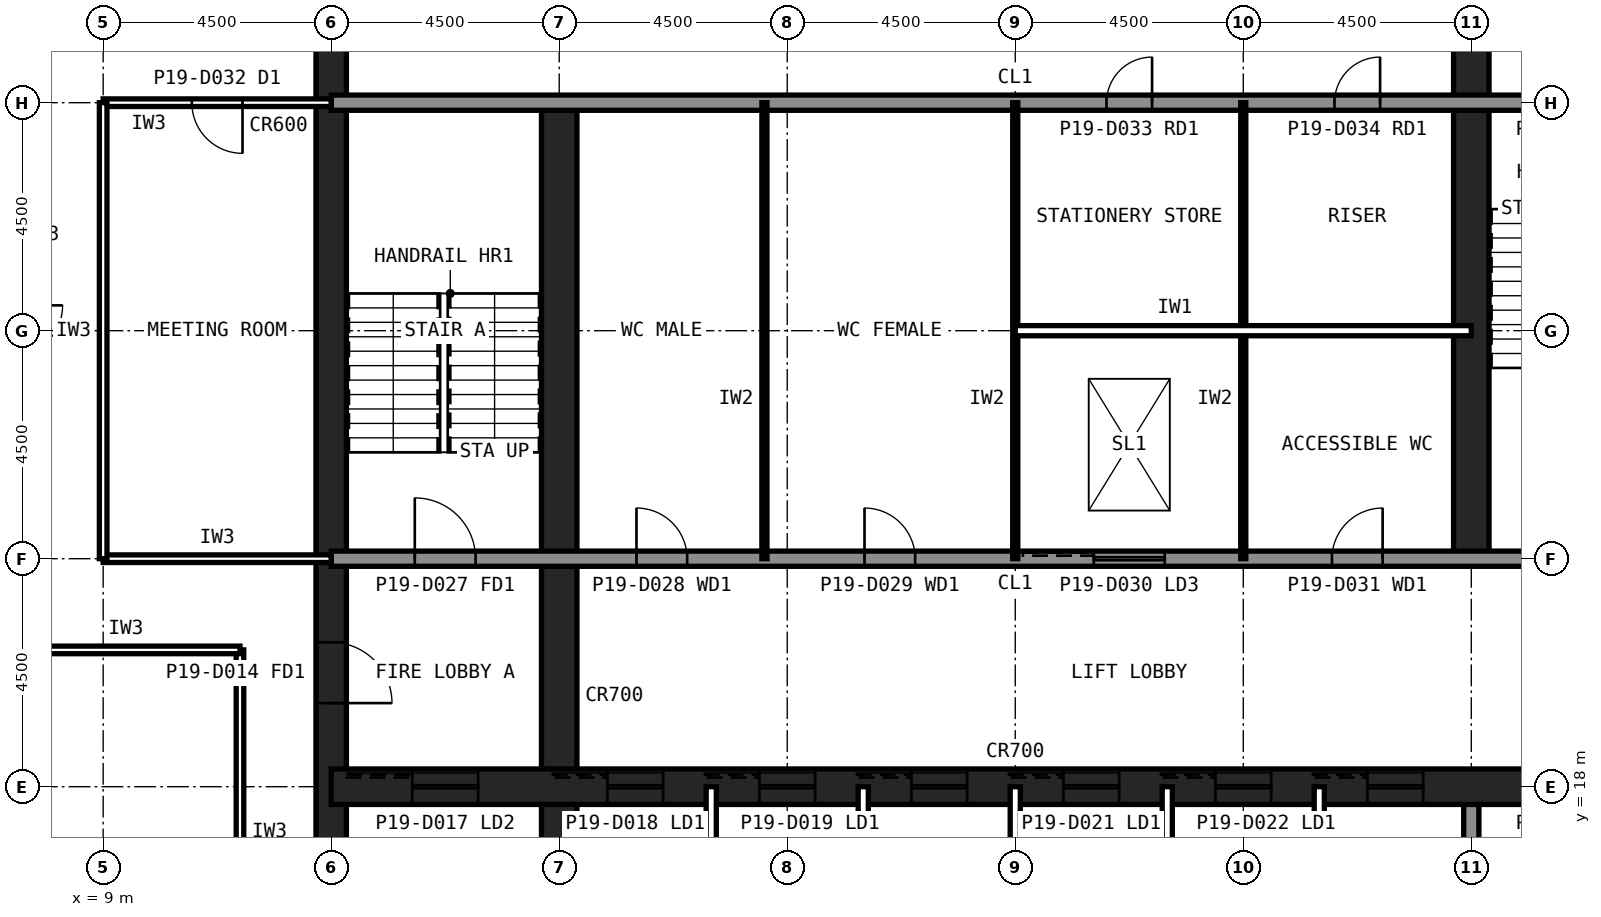
"""IFC4 building model, lengths in metres.
Left out: names, types, materials, properties, quantities, classifications, styles, units other than length and angle.
Written with IfcOpenShell. Run it as: python <this file> out.ifc"""

import sys

from ifc_helpers import new_model, si_unit, direction, frame, frame_2d, origin, place, context, subcontext, project, spatial, rectangle, extrude, element, fill, save


model = new_model("IFC4")
c1 = context("Model", 3, precision=1e-05, world=origin(), true_north=direction((0.0, 1.0)))
c2 = subcontext(c1, "Body", "Model", "MODEL_VIEW")
j1 = project(units=[si_unit("LENGTHUNIT", "METRE"), si_unit("PLANEANGLEUNIT", "RADIAN")], contexts=[c1])
p1 = place(None, origin())
s1 = spatial("IfcSite", under=j1, at=p1, CompositionType="ELEMENT")
p2 = place(p1, origin())
s2 = spatial("IfcBuilding", under=s1, at=p2, CompositionType="ELEMENT")
p3 = place(p2, frame((0.0, 0.0, 79.4)))
s3 = spatial("IfcBuildingStorey", under=s2, at=p3, CompositionType="ELEMENT", Elevation=79.4)
p4 = place(p3, frame((13.5, 40.5, 0.0), z_axis=(0.0, 0.0, 1.0), x_axis=(0.0, -1.0, 0.0)))
e1 = element("IfcWall", 1, at=p4, inside=s3, PredefinedType="SHEAR", context=c2, shape_type="SweptSolid", body=[
    extrude(rectangle(XDim=27.0, YDim=0.6, at=frame_2d((13.5, 0.0))), origin(), (0.0, 0.0, 1.0), 4.2),
])
p5 = place(p4, frame((19.65, 0.0, 0.0)))
e2 = element("IfcOpeningElement", 2, at=p5, cuts=e1, PredefinedType="OPENING", context=c2, shape_type="SweptSolid", body=[
    extrude(rectangle(XDim=1.2, YDim=2.1, at=frame_2d((0.6, 1.05))), frame((0.0, 0.31, 0.0), z_axis=(0.0, -1.0, 0.0), x_axis=(1.0, 0.0, 0.0)), (0.0, 0.0, 1.0), 0.62),
])
p6 = place(p4, frame((5.85, 0.0, 0.0)))
e3 = element("IfcOpeningElement", 3, at=p6, cuts=e1, PredefinedType="OPENING", context=c2, shape_type="SweptSolid", body=[
    extrude(rectangle(XDim=1.8, YDim=2.1, at=frame_2d((0.9, 1.05))), frame((0.0, 0.31, 0.0), z_axis=(0.0, -1.0, 0.0), x_axis=(1.0, 0.0, 0.0)), (0.0, 0.0, 1.0), 0.62),
])
p7 = place(p3, frame((18.0, 13.5, 0.0), z_axis=(0.0, 0.0, 1.0), x_axis=(0.0, 1.0, 0.0)))
e4 = element("IfcWall", 4, at=p7, inside=s3, PredefinedType="SHEAR", context=c2, shape_type="SweptSolid", body=[
    extrude(rectangle(XDim=18.0, YDim=0.7, at=frame_2d((9.0, 0.0))), origin(), (0.0, 0.0, 1.0), 4.2),
])
p8 = place(p3, frame((36.0, 13.5, 0.0), z_axis=(0.0, 0.0, 1.0), x_axis=(0.0, 1.0, 0.0)))
e5 = element("IfcWall", 5, at=p8, inside=s3, PredefinedType="SOLIDWALL", context=c2, shape_type="SweptSolid", body=[
    extrude(rectangle(XDim=4.5, YDim=0.3, at=frame_2d((2.25, 0.0))), origin(), (0.0, 0.0, 1.0), 4.04),
])
p9 = place(p3, frame((36.0, 22.5, 0.0), z_axis=(0.0, 0.0, 1.0), x_axis=(0.0, 1.0, 0.0)))
e6 = element("IfcWall", 6, at=p9, inside=s3, PredefinedType="SHEAR", context=c2, shape_type="SweptSolid", body=[
    extrude(rectangle(XDim=18.0, YDim=0.7, at=frame_2d((9.0, 0.0))), origin(), (0.0, 0.0, 1.0), 4.2),
])
p10 = place(p3, frame((13.5, 18.0, 0.0), z_axis=(0.0, 0.0, 1.0), x_axis=(1.0, 0.0, 0.0)))
e7 = element("IfcWall", 7, at=p10, inside=s3, PredefinedType="SHEAR", context=c2, shape_type="SweptSolid", body=[
    extrude(rectangle(XDim=27.0, YDim=0.7, at=frame_2d((13.5, 0.0))), origin(), (0.0, 0.0, 1.0), 4.2),
])
p11 = place(p10, frame((24.3, 0.0, 0.0)))
e8 = element("IfcOpeningElement", 8, at=p11, cuts=e7, PredefinedType="OPENING", context=c2, shape_type="SweptSolid", body=[
    extrude(rectangle(XDim=0.9, YDim=2.1, at=frame_2d((0.45, 1.05))), frame((0.0, 0.36, 0.0), z_axis=(0.0, -1.0, 0.0), x_axis=(1.0, 0.0, 0.0)), (0.0, 0.0, 1.0), 0.72),
])
p12 = place(p10, frame((5.45, 0.0, 0.0)))
e9 = element("IfcOpeningElement", 9, at=p12, cuts=e7, PredefinedType="OPENING", context=c2, shape_type="SweptSolid", body=[
    extrude(rectangle(XDim=1.1, YDim=2.1, at=frame_2d((0.55, 1.05))), frame((0.0, 0.36, 0.0), z_axis=(0.0, -1.0, 0.0), x_axis=(1.0, 0.0, 0.0)), (0.0, 0.0, 1.0), 0.72),
])
p13 = place(p10, frame((8.45, 0.0, 0.0)))
e10 = element("IfcOpeningElement", 10, at=p13, cuts=e7, PredefinedType="OPENING", context=c2, shape_type="SweptSolid", body=[
    extrude(rectangle(XDim=1.1, YDim=2.1, at=frame_2d((0.55, 1.05))), frame((0.0, 0.36, 0.0), z_axis=(0.0, -1.0, 0.0), x_axis=(1.0, 0.0, 0.0)), (0.0, 0.0, 1.0), 0.72),
])
p14 = place(p10, frame((11.45, 0.0, 0.0)))
e11 = element("IfcOpeningElement", 11, at=p14, cuts=e7, PredefinedType="OPENING", context=c2, shape_type="SweptSolid", body=[
    extrude(rectangle(XDim=1.1, YDim=2.1, at=frame_2d((0.55, 1.05))), frame((0.0, 0.36, 0.0), z_axis=(0.0, -1.0, 0.0), x_axis=(1.0, 0.0, 0.0)), (0.0, 0.0, 1.0), 0.72),
])
p15 = place(p10, frame((14.45, 0.0, 0.0)))
e12 = element("IfcOpeningElement", 12, at=p15, cuts=e7, PredefinedType="OPENING", context=c2, shape_type="SweptSolid", body=[
    extrude(rectangle(XDim=1.1, YDim=2.1, at=frame_2d((0.55, 1.05))), frame((0.0, 0.36, 0.0), z_axis=(0.0, -1.0, 0.0), x_axis=(1.0, 0.0, 0.0)), (0.0, 0.0, 1.0), 0.72),
])
p16 = place(p10, frame((17.45, 0.0, 0.0)))
e13 = element("IfcOpeningElement", 13, at=p16, cuts=e7, PredefinedType="OPENING", context=c2, shape_type="SweptSolid", body=[
    extrude(rectangle(XDim=1.1, YDim=2.1, at=frame_2d((0.55, 1.05))), frame((0.0, 0.36, 0.0), z_axis=(0.0, -1.0, 0.0), x_axis=(1.0, 0.0, 0.0)), (0.0, 0.0, 1.0), 0.72),
])
p17 = place(p10, frame((20.45, 0.0, 0.0)))
e14 = element("IfcOpeningElement", 14, at=p17, cuts=e7, PredefinedType="OPENING", context=c2, shape_type="SweptSolid", body=[
    extrude(rectangle(XDim=1.1, YDim=2.1, at=frame_2d((0.55, 1.05))), frame((0.0, 0.36, 0.0), z_axis=(0.0, -1.0, 0.0), x_axis=(1.0, 0.0, 0.0)), (0.0, 0.0, 1.0), 0.72),
])
p18 = place(p10, frame((1.6, 0.0, 0.0)))
e15 = element("IfcOpeningElement", 15, at=p18, cuts=e7, PredefinedType="OPENING", context=c2, shape_type="SweptSolid", body=[
    extrude(rectangle(XDim=1.3, YDim=2.2, at=frame_2d((0.65, 1.1))), frame((0.0, 0.36, 0.0), z_axis=(0.0, -1.0, 0.0), x_axis=(1.0, 0.0, 0.0)), (0.0, 0.0, 1.0), 0.72),
])
p19 = place(p3, frame((13.5, 22.5, 0.0), z_axis=(0.0, 0.0, 1.0), x_axis=(1.0, 0.0, 0.0)))
e16 = element("IfcWall", 16, at=p19, inside=s3, PredefinedType="SOLIDWALL", context=c2, shape_type="SweptSolid", body=[
    extrude(rectangle(XDim=27.0, YDim=0.3, at=frame_2d((13.5, 0.0))), origin(), (0.0, 0.0, 1.0), 4.04),
])
p20 = place(p19, frame((1.65, 0.0, 0.0)))
e17 = element("IfcOpeningElement", 17, at=p20, cuts=e16, PredefinedType="OPENING", context=c2, shape_type="SweptSolid", body=[
    extrude(rectangle(XDim=1.2, YDim=2.1, at=frame_2d((0.6, 1.05))), frame((0.0, 0.16, 0.0), z_axis=(0.0, -1.0, 0.0), x_axis=(1.0, 0.0, 0.0)), (0.0, 0.0, 1.0), 0.32),
])
p21 = place(p19, frame((6.025, 0.0, 0.0)))
e18 = element("IfcOpeningElement", 18, at=p21, cuts=e16, PredefinedType="OPENING", context=c2, shape_type="SweptSolid", body=[
    extrude(rectangle(XDim=1.0, YDim=2.1, at=frame_2d((0.5, 1.05))), frame((0.0, 0.16, 0.0), z_axis=(0.0, -1.0, 0.0), x_axis=(1.0, 0.0, 0.0)), (0.0, 0.0, 1.0), 0.32),
])
p22 = place(p19, frame((10.525, 0.0, 0.0)))
e19 = element("IfcOpeningElement", 19, at=p22, cuts=e16, PredefinedType="OPENING", context=c2, shape_type="SweptSolid", body=[
    extrude(rectangle(XDim=1.0, YDim=2.1, at=frame_2d((0.5, 1.05))), frame((0.0, 0.16, 0.0), z_axis=(0.0, -1.0, 0.0), x_axis=(1.0, 0.0, 0.0)), (0.0, 0.0, 1.0), 0.32),
])
p23 = place(p19, frame((19.75, 0.0, 0.0)))
e20 = element("IfcOpeningElement", 20, at=p23, cuts=e16, PredefinedType="OPENING", context=c2, shape_type="SweptSolid", body=[
    extrude(rectangle(XDim=1.0, YDim=2.1, at=frame_2d((0.5, 1.05))), frame((0.0, 0.16, 0.0), z_axis=(0.0, -1.0, 0.0), x_axis=(1.0, 0.0, 0.0)), (0.0, 0.0, 1.0), 0.32),
])
p24 = place(p19, frame((15.05, 0.0, 0.0)))
e21 = element("IfcOpeningElement", 21, at=p24, cuts=e16, PredefinedType="OPENING", context=c2, shape_type="SweptSolid", body=[
    extrude(rectangle(XDim=1.4, YDim=2.4, at=frame_2d((0.7, 1.2))), frame((0.0, 0.16, 0.0), z_axis=(0.0, -1.0, 0.0), x_axis=(1.0, 0.0, 0.0)), (0.0, 0.0, 1.0), 0.32),
])
p25 = place(p3, frame((13.5, 31.5, 0.0), z_axis=(0.0, 0.0, 1.0), x_axis=(1.0, 0.0, 0.0)))
e22 = element("IfcWall", 22, at=p25, inside=s3, PredefinedType="SOLIDWALL", context=c2, shape_type="SweptSolid", body=[
    extrude(rectangle(XDim=27.0, YDim=0.3, at=frame_2d((13.5, 0.0))), origin(), (0.0, 0.0, 1.0), 4.04),
])
p26 = place(p25, frame((24.15, 0.0, 0.0)))
e23 = element("IfcOpeningElement", 23, at=p26, cuts=e22, PredefinedType="OPENING", context=c2, shape_type="SweptSolid", body=[
    extrude(rectangle(XDim=1.2, YDim=2.1, at=frame_2d((0.6, 1.05))), frame((0.0, 0.16, 0.0), z_axis=(0.0, -1.0, 0.0), x_axis=(1.0, 0.0, 0.0)), (0.0, 0.0, 1.0), 0.32),
])
p27 = place(p25, frame((15.3, 0.0, 0.0)))
e24 = element("IfcOpeningElement", 24, at=p27, cuts=e22, PredefinedType="OPENING", context=c2, shape_type="SweptSolid", body=[
    extrude(rectangle(XDim=0.9, YDim=2.1, at=frame_2d((0.45, 1.05))), frame((0.0, 0.16, 0.0), z_axis=(0.0, -1.0, 0.0), x_axis=(1.0, 0.0, 0.0)), (0.0, 0.0, 1.0), 0.32),
])
p28 = place(p25, frame((19.8, 0.0, 0.0)))
e25 = element("IfcOpeningElement", 25, at=p28, cuts=e22, PredefinedType="OPENING", context=c2, shape_type="SweptSolid", body=[
    extrude(rectangle(XDim=0.9, YDim=2.1, at=frame_2d((0.45, 1.05))), frame((0.0, 0.16, 0.0), z_axis=(0.0, -1.0, 0.0), x_axis=(1.0, 0.0, 0.0)), (0.0, 0.0, 1.0), 0.32),
])
for number, where, z_axis, x_axis in (
    (26, (21.0, 13.5, 0.0), (0.0, 0.0, 1.0), (0.0, 1.0, 0.0)),
    (27, (24.0, 13.5, 0.0), (0.0, 0.0, 1.0), (0.0, 1.0, 0.0)),
    (28, (27.0, 13.5, 0.0), (0.0, 0.0, 1.0), (0.0, 1.0, 0.0)),
    (29, (30.0, 13.5, 0.0), (0.0, 0.0, 1.0), (0.0, 1.0, 0.0)),
    (30, (33.0, 13.5, 0.0), (0.0, 0.0, 1.0), (0.0, 1.0, 0.0)),
):
    element("IfcWall", number, at=place(p3, frame(where, z_axis=z_axis, x_axis=x_axis)), inside=s3, PredefinedType="PARTITIONING", context=c2, shape_type="SweptSolid", body=[
        extrude(rectangle(XDim=4.5, YDim=0.2, at=frame_2d((2.25, 0.0))), origin(), (0.0, 0.0, 1.0), 4.04),
    ])
for number, where, z_axis, x_axis in (
    (31, (22.05, 22.5, 0.0), (0.0, 0.0, 1.0), (0.0, 1.0, 0.0)),
    (32, (27.0, 22.5, 0.0), (0.0, 0.0, 1.0), (0.0, 1.0, 0.0)),
    (33, (31.5, 22.5, 0.0), (0.0, 0.0, 1.0), (0.0, 1.0, 0.0)),
):
    element("IfcWall", number, at=place(p3, frame(where, z_axis=z_axis, x_axis=x_axis)), inside=s3, PredefinedType="PLUMBINGWALL", context=c2, shape_type="SweptSolid", body=[
        extrude(rectangle(XDim=9.0, YDim=0.1, at=frame_2d((4.5, 0.0))), origin(), (0.0, 0.0, 1.0), 4.04),
    ])
p29 = place(p3, frame((27.0, 27.0, 0.0), z_axis=(0.0, 0.0, 1.0), x_axis=(1.0, 0.0, 0.0)))
e34 = element("IfcWall", 34, at=p29, inside=s3, PredefinedType="PARTITIONING", context=c2, shape_type="SweptSolid", body=[
    extrude(rectangle(XDim=9.0, YDim=0.2, at=frame_2d((4.5, 0.0))), origin(), (0.0, 0.0, 1.0), 4.04),
])
p30 = place(p3, frame((11.7, 20.7, 0.0), z_axis=(0.0, 0.0, 1.0), x_axis=(0.0, -1.0, 0.0)))
e35 = element("IfcWall", 35, at=p30, inside=s3, PredefinedType="PARTITIONING", context=c2, shape_type="SweptSolid", body=[
    extrude(rectangle(XDim=7.2, YDim=0.15, at=frame_2d((3.6, 0.0))), origin(), (0.0, 0.0, 1.0), 4.04),
])
p31 = place(p3, frame((7.2, 20.7, 0.0), z_axis=(0.0, 0.0, 1.0), x_axis=(1.0, 0.0, 0.0)))
e36 = element("IfcWall", 36, at=p31, inside=s3, PredefinedType="PARTITIONING", context=c2, shape_type="SweptSolid", body=[
    extrude(rectangle(XDim=4.5, YDim=0.15, at=frame_2d((2.25, 0.0))), origin(), (0.0, 0.0, 1.0), 4.04),
])
p32 = place(p3, frame((9.0, 22.5, 0.0), z_axis=(0.0, 0.0, 1.0), x_axis=(1.0, 0.0, 0.0)))
e37 = element("IfcWall", 37, at=p32, inside=s3, PredefinedType="PARTITIONING", context=c2, shape_type="SweptSolid", body=[
    extrude(rectangle(XDim=4.5, YDim=0.15, at=frame_2d((2.25, 0.0))), origin(), (0.0, 0.0, 1.0), 3.189),
])
p33 = place(p3, frame((13.5, 31.5, 0.0), z_axis=(0.0, 0.0, 1.0), x_axis=(-1.0, 0.0, 0.0)))
e38 = element("IfcWall", 38, at=p33, inside=s3, PredefinedType="PARTITIONING", context=c2, shape_type="SweptSolid", body=[
    extrude(rectangle(XDim=4.5, YDim=0.15, at=frame_2d((2.25, 0.0))), origin(), (0.0, 0.0, 1.0), 3.189),
])
p34 = place(p33, frame((1.75, 0.0, 0.0)))
e39 = element("IfcOpeningElement", 39, at=p34, cuts=e38, PredefinedType="OPENING", context=c2, shape_type="SweptSolid", body=[
    extrude(rectangle(XDim=1.0, YDim=2.1, at=frame_2d((0.5, 1.05))), frame((0.0, 0.085, 0.0), z_axis=(0.0, -1.0, 0.0), x_axis=(1.0, 0.0, 0.0)), (0.0, 0.0, 1.0), 0.17),
])
p35 = place(p3, frame((9.0, 31.5, 0.0), z_axis=(0.0, 0.0, 1.0), x_axis=(0.0, -1.0, 0.0)))
e40 = element("IfcWall", 40, at=p35, inside=s3, PredefinedType="PARTITIONING", context=c2, shape_type="SweptSolid", body=[
    extrude(rectangle(XDim=9.0, YDim=0.15, at=frame_2d((4.5, 0.0))), origin(), (0.0, 0.0, 1.0), 4.04),
])
p36 = place(p5, origin())
e41 = element("IfcDoor", 41, at=p36, inside=s3, OperationType="SINGLE_SWING_RIGHT", PredefinedType="DOOR", context=c2, shape_type="SweptSolid", body=[
    extrude(rectangle(XDim=1.2, YDim=2.1, at=frame_2d((0.6, 1.05))), frame((0.0, 0.025, 0.0), z_axis=(0.0, -1.0, 0.0), x_axis=(1.0, 0.0, 0.0)), (0.0, 0.0, 1.0), 0.05),
])
fill(e2, e41)
p37 = place(p20, origin())
e42 = element("IfcDoor", 42, at=p37, inside=s3, OperationType="SINGLE_SWING_LEFT", PredefinedType="DOOR", context=c2, shape_type="SweptSolid", body=[
    extrude(rectangle(XDim=1.2, YDim=2.1, at=frame_2d((0.6, 1.05))), frame((0.0, 0.025, 0.0), z_axis=(0.0, -1.0, 0.0), x_axis=(1.0, 0.0, 0.0)), (0.0, 0.0, 1.0), 0.05),
])
fill(e17, e42)
p38 = place(p21, origin())
e43 = element("IfcDoor", 43, at=p38, inside=s3, OperationType="SINGLE_SWING_LEFT", PredefinedType="DOOR", context=c2, shape_type="SweptSolid", body=[
    extrude(rectangle(XDim=1.0, YDim=2.1, at=frame_2d((0.5, 1.05))), frame((0.0, 0.025, 0.0), z_axis=(0.0, -1.0, 0.0), x_axis=(1.0, 0.0, 0.0)), (0.0, 0.0, 1.0), 0.05),
])
fill(e18, e43)
p39 = place(p22, origin())
e44 = element("IfcDoor", 44, at=p39, inside=s3, OperationType="SINGLE_SWING_LEFT", PredefinedType="DOOR", context=c2, shape_type="SweptSolid", body=[
    extrude(rectangle(XDim=1.0, YDim=2.1, at=frame_2d((0.5, 1.05))), frame((0.0, 0.025, 0.0), z_axis=(0.0, -1.0, 0.0), x_axis=(1.0, 0.0, 0.0)), (0.0, 0.0, 1.0), 0.05),
])
fill(e19, e44)
p40 = place(p23, origin())
e45 = element("IfcDoor", 45, at=p40, inside=s3, OperationType="SINGLE_SWING_RIGHT", PredefinedType="DOOR", context=c2, shape_type="SweptSolid", body=[
    extrude(rectangle(XDim=1.0, YDim=2.1, at=frame_2d((0.5, 1.05))), frame((0.0, 0.025, 0.0), z_axis=(0.0, -1.0, 0.0), x_axis=(1.0, 0.0, 0.0)), (0.0, 0.0, 1.0), 0.05),
])
fill(e20, e45)
p41 = place(p27, origin())
e46 = element("IfcDoor", 46, at=p41, inside=s3, OperationType="SINGLE_SWING_RIGHT", PredefinedType="DOOR", context=c2, shape_type="SweptSolid", body=[
    extrude(rectangle(XDim=0.9, YDim=2.1, at=frame_2d((0.45, 1.05))), frame((0.0, 0.025, 0.0), z_axis=(0.0, -1.0, 0.0), x_axis=(1.0, 0.0, 0.0)), (0.0, 0.0, 1.0), 0.05),
])
fill(e24, e46)
p42 = place(p28, origin())
e47 = element("IfcDoor", 47, at=p42, inside=s3, OperationType="SINGLE_SWING_RIGHT", PredefinedType="DOOR", context=c2, shape_type="SweptSolid", body=[
    extrude(rectangle(XDim=0.9, YDim=2.1, at=frame_2d((0.45, 1.05))), frame((0.0, 0.025, 0.0), z_axis=(0.0, -1.0, 0.0), x_axis=(1.0, 0.0, 0.0)), (0.0, 0.0, 1.0), 0.05),
])
fill(e25, e47)
p43 = place(p12, origin())
e48 = element("IfcDoor", 48, at=p43, inside=s3, OperationType="SLIDING_TO_LEFT", PredefinedType="DOOR", context=c2, shape_type="SweptSolid", body=[
    extrude(rectangle(XDim=1.1, YDim=2.1, at=frame_2d((0.55, 1.05))), frame((0.0, 0.025, 0.0), z_axis=(0.0, -1.0, 0.0), x_axis=(1.0, 0.0, 0.0)), (0.0, 0.0, 1.0), 0.05),
])
fill(e9, e48)
p44 = place(p13, origin())
e49 = element("IfcDoor", 49, at=p44, inside=s3, OperationType="SLIDING_TO_LEFT", PredefinedType="DOOR", context=c2, shape_type="SweptSolid", body=[
    extrude(rectangle(XDim=1.1, YDim=2.1, at=frame_2d((0.55, 1.05))), frame((0.0, 0.025, 0.0), z_axis=(0.0, -1.0, 0.0), x_axis=(1.0, 0.0, 0.0)), (0.0, 0.0, 1.0), 0.05),
])
fill(e10, e49)
p45 = place(p14, origin())
e50 = element("IfcDoor", 50, at=p45, inside=s3, OperationType="SLIDING_TO_LEFT", PredefinedType="DOOR", context=c2, shape_type="SweptSolid", body=[
    extrude(rectangle(XDim=1.1, YDim=2.1, at=frame_2d((0.55, 1.05))), frame((0.0, 0.025, 0.0), z_axis=(0.0, -1.0, 0.0), x_axis=(1.0, 0.0, 0.0)), (0.0, 0.0, 1.0), 0.05),
])
fill(e11, e50)
p46 = place(p15, origin())
e51 = element("IfcDoor", 51, at=p46, inside=s3, OperationType="SLIDING_TO_LEFT", PredefinedType="DOOR", context=c2, shape_type="SweptSolid", body=[
    extrude(rectangle(XDim=1.1, YDim=2.1, at=frame_2d((0.55, 1.05))), frame((0.0, 0.025, 0.0), z_axis=(0.0, -1.0, 0.0), x_axis=(1.0, 0.0, 0.0)), (0.0, 0.0, 1.0), 0.05),
])
fill(e12, e51)
p47 = place(p16, origin())
e52 = element("IfcDoor", 52, at=p47, inside=s3, OperationType="SLIDING_TO_LEFT", PredefinedType="DOOR", context=c2, shape_type="SweptSolid", body=[
    extrude(rectangle(XDim=1.1, YDim=2.1, at=frame_2d((0.55, 1.05))), frame((0.0, 0.025, 0.0), z_axis=(0.0, -1.0, 0.0), x_axis=(1.0, 0.0, 0.0)), (0.0, 0.0, 1.0), 0.05),
])
fill(e13, e52)
p48 = place(p17, origin())
e53 = element("IfcDoor", 53, at=p48, inside=s3, OperationType="SLIDING_TO_LEFT", PredefinedType="DOOR", context=c2, shape_type="SweptSolid", body=[
    extrude(rectangle(XDim=1.1, YDim=2.1, at=frame_2d((0.55, 1.05))), frame((0.0, 0.025, 0.0), z_axis=(0.0, -1.0, 0.0), x_axis=(1.0, 0.0, 0.0)), (0.0, 0.0, 1.0), 0.05),
])
fill(e14, e53)
p49 = place(p18, origin())
e54 = element("IfcDoor", 54, at=p49, inside=s3, OperationType="SLIDING_TO_LEFT", PredefinedType="DOOR", context=c2, shape_type="SweptSolid", body=[
    extrude(rectangle(XDim=1.3, YDim=2.2, at=frame_2d((0.65, 1.1))), frame((0.0, 0.025, 0.0), z_axis=(0.0, -1.0, 0.0), x_axis=(1.0, 0.0, 0.0)), (0.0, 0.0, 1.0), 0.05),
])
fill(e15, e54)
p50 = place(p24, origin())
e55 = element("IfcDoor", 55, at=p50, inside=s3, OperationType="SLIDING_TO_LEFT", PredefinedType="DOOR", context=c2, shape_type="SweptSolid", body=[
    extrude(rectangle(XDim=1.4, YDim=2.4, at=frame_2d((0.7, 1.2))), frame((0.0, 0.025, 0.0), z_axis=(0.0, -1.0, 0.0), x_axis=(1.0, 0.0, 0.0)), (0.0, 0.0, 1.0), 0.05),
])
fill(e21, e55)
p51 = place(p34, origin())
e56 = element("IfcDoor", 56, at=p51, inside=s3, OperationType="SINGLE_SWING_LEFT", PredefinedType="DOOR", context=c2, shape_type="SweptSolid", body=[
    extrude(rectangle(XDim=1.0, YDim=2.1, at=frame_2d((0.5, 1.05))), frame((0.0, 0.025, 0.0), z_axis=(0.0, -1.0, 0.0), x_axis=(1.0, 0.0, 0.0)), (0.0, 0.0, 1.0), 0.05),
])
fill(e39, e56)
save(model, sys.argv[1])
